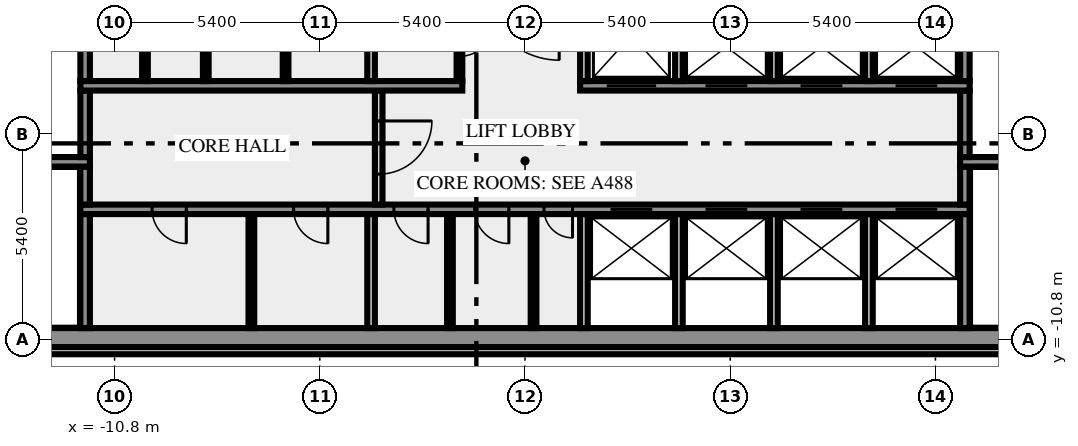
"""IFC4 building model, lengths in metres.
Left out: names, types, materials, properties, quantities, classifications, styles, units other than length and angle.
Written with IfcOpenShell. Run it as: python <this file> out.ifc"""

import sys

from ifc_helpers import new_model, si_unit, direction, frame, frame_2d, origin, place, context, subcontext, project, spatial, rectangle, extrude, element, fill, save


model = new_model("IFC4")
c1 = context("Model", 3, precision=1e-05, world=origin(), true_north=direction((0.0, 1.0)))
c2 = subcontext(c1, "Body", "Model", "MODEL_VIEW")
j1 = project(units=[si_unit("LENGTHUNIT", "METRE"), si_unit("PLANEANGLEUNIT", "RADIAN")], contexts=[c1])
p1 = place(None, origin())
s1 = spatial("IfcSite", under=j1, at=p1, CompositionType="ELEMENT")
p2 = place(p1, origin())
s2 = spatial("IfcBuilding", under=s1, at=p2, CompositionType="ELEMENT")
p3 = place(p2, frame((0.0, 0.0, 184.0)))
s3 = spatial("IfcBuildingStorey", under=s2, at=p3, CompositionType="ELEMENT", Elevation=184.0)
p4 = place(p3, frame((-17.444, -11.088, 0.0), z_axis=(0.0, 0.0, 1.0), x_axis=(1.0, 0.0, 0.0)))
e1 = element("IfcWall", 1, at=p4, inside=s3, PredefinedType="SOLIDWALL", context=c2, shape_type="SweptSolid", body=[
    extrude(rectangle(XDim=34.888, YDim=0.2, at=frame_2d((17.444, 0.0))), origin(), (0.0, 0.0, 1.0), 3.4),
])
p5 = place(p3, frame((-20.0, -10.75, 0.0), z_axis=(0.0, 0.0, 1.0), x_axis=(1.0, 0.0, 0.0)))
e2 = element("IfcWall", 2, at=p5, inside=s3, PredefinedType="SHEAR", context=c2, shape_type="SweptSolid", body=[
    extrude(rectangle(XDim=40.0, YDim=0.5, at=frame_2d((20.0, 0.0))), origin(), (0.0, 0.0, 1.0), 3.4),
])
p6 = place(p5, frame((0.8, 0.0, 1.0)))
e3 = element("IfcOpeningElement", 3, at=p6, cuts=e2, PredefinedType="OPENING", context=c2, shape_type="SweptSolid", body=[
    extrude(rectangle(XDim=1.2, YDim=1.2, at=frame_2d((0.6, 0.6))), frame((0.0, 0.26, 0.0), z_axis=(0.0, -1.0, 0.0), x_axis=(1.0, 0.0, 0.0)), (0.0, 0.0, 1.0), 0.52),
])
p7 = place(p5, frame((38.0, 0.0, 1.0)))
e4 = element("IfcOpeningElement", 4, at=p7, cuts=e2, PredefinedType="OPENING", context=c2, shape_type="SweptSolid", body=[
    extrude(rectangle(XDim=1.2, YDim=1.2, at=frame_2d((0.6, 0.6))), frame((0.0, 0.26, 0.0), z_axis=(0.0, -1.0, 0.0), x_axis=(1.0, 0.0, 0.0)), (0.0, 0.0, 1.0), 0.52),
])
p8 = place(p3, frame((-11.575, -10.5, 0.0), z_axis=(0.0, 0.0, 1.0), x_axis=(0.0, 1.0, 0.0)))
e5 = element("IfcWall", 5, at=p8, inside=s3, PredefinedType="SHEAR", context=c2, shape_type="SweptSolid", body=[
    extrude(rectangle(XDim=3.0, YDim=0.25, at=frame_2d((1.5, 0.0))), origin(), (0.0, 0.0, 1.0), 3.4),
])
p9 = place(p3, frame((-7.2, -10.5, 0.0), z_axis=(0.0, 0.0, 1.0), x_axis=(0.0, 1.0, 0.0)))
e6 = element("IfcWall", 6, at=p9, inside=s3, PredefinedType="PARTITIONING", context=c2, shape_type="SweptSolid", body=[
    extrude(rectangle(XDim=3.0, YDim=0.15, at=frame_2d((1.5, 0.0))), origin(), (0.0, 0.0, 1.0), 3.4),
])
p10 = place(p3, frame((-4.05, -10.5, 0.0), z_axis=(0.0, 0.0, 1.0), x_axis=(0.0, 1.0, 0.0)))
e7 = element("IfcWall", 7, at=p10, inside=s3, PredefinedType="SOLIDWALL", context=c2, shape_type="SweptSolid", body=[
    extrude(rectangle(XDim=3.0, YDim=0.2, at=frame_2d((1.5, 0.0))), origin(), (0.0, 0.0, 1.0), 3.4),
])
for number, where, z_axis, x_axis in (
    (8, (-1.975, -10.5, 0.0), (0.0, 0.0, 1.0), (0.0, 1.0, 0.0)),
    (9, (0.225, -10.5, 0.0), (0.0, 0.0, 1.0), (0.0, 1.0, 0.0)),
):
    element("IfcWall", number, at=place(p3, frame(where, z_axis=z_axis, x_axis=x_axis)), inside=s3, PredefinedType="PARTITIONING", context=c2, shape_type="SweptSolid", body=[
        extrude(rectangle(XDim=3.0, YDim=0.15, at=frame_2d((1.5, 0.0))), origin(), (0.0, 0.0, 1.0), 3.4),
    ])
for number, where, z_axis, x_axis in (
    (10, (1.55, -10.5, 0.0), (0.0, 0.0, 1.0), (0.0, 1.0, 0.0)),
    (11, (4.05, -10.5, 0.0), (0.0, 0.0, 1.0), (0.0, 1.0, 0.0)),
    (12, (6.55, -10.5, 0.0), (0.0, 0.0, 1.0), (0.0, 1.0, 0.0)),
    (13, (9.05, -10.5, 0.0), (0.0, 0.0, 1.0), (0.0, 1.0, 0.0)),
):
    element("IfcWall", number, at=place(p3, frame(where, z_axis=z_axis, x_axis=x_axis)), inside=s3, PredefinedType="SOLIDWALL", context=c2, shape_type="SweptSolid", body=[
        extrude(rectangle(XDim=3.0, YDim=0.2, at=frame_2d((1.5, 0.0))), origin(), (0.0, 0.0, 1.0), 3.4),
    ])
p11 = place(p3, frame((11.575, -10.5, 0.0), z_axis=(0.0, 0.0, 1.0), x_axis=(0.0, 1.0, 0.0)))
e14 = element("IfcWall", 14, at=p11, inside=s3, PredefinedType="SHEAR", context=c2, shape_type="SweptSolid", body=[
    extrude(rectangle(XDim=3.0, YDim=0.25, at=frame_2d((1.5, 0.0))), origin(), (0.0, 0.0, 1.0), 3.4),
])
p12 = place(p3, frame((11.7, -7.375, 0.0), z_axis=(0.0, 0.0, 1.0), x_axis=(-1.0, 0.0, 0.0)))
e15 = element("IfcWall", 15, at=p12, inside=s3, PredefinedType="SHEAR", context=c2, shape_type="SweptSolid", body=[
    extrude(rectangle(XDim=23.4, YDim=0.25, at=frame_2d((11.7, 0.0))), origin(), (0.0, 0.0, 1.0), 3.4),
])
p13 = place(p12, frame((20.613, 0.0, 0.0)))
e16 = element("IfcOpeningElement", 16, at=p13, cuts=e15, PredefinedType="OPENING", context=c2, shape_type="SweptSolid", body=[
    extrude(rectangle(XDim=0.9, YDim=2.1, at=frame_2d((0.45, 1.05))), frame((0.0, 0.135, 0.0), z_axis=(0.0, -1.0, 0.0), x_axis=(1.0, 0.0, 0.0)), (0.0, 0.0, 1.0), 0.27),
])
p14 = place(p12, frame((16.888, 0.0, 0.0)))
e17 = element("IfcOpeningElement", 17, at=p14, cuts=e15, PredefinedType="OPENING", context=c2, shape_type="SweptSolid", body=[
    extrude(rectangle(XDim=0.9, YDim=2.1, at=frame_2d((0.45, 1.05))), frame((0.0, 0.135, 0.0), z_axis=(0.0, -1.0, 0.0), x_axis=(1.0, 0.0, 0.0)), (0.0, 0.0, 1.0), 0.27),
])
p15 = place(p12, frame((14.25, 0.0, 0.0)))
e18 = element("IfcOpeningElement", 18, at=p15, cuts=e15, PredefinedType="OPENING", context=c2, shape_type="SweptSolid", body=[
    extrude(rectangle(XDim=0.9, YDim=2.1, at=frame_2d((0.45, 1.05))), frame((0.0, 0.135, 0.0), z_axis=(0.0, -1.0, 0.0), x_axis=(1.0, 0.0, 0.0)), (0.0, 0.0, 1.0), 0.27),
])
p16 = place(p12, frame((12.125, 0.0, 0.0)))
e19 = element("IfcOpeningElement", 19, at=p16, cuts=e15, PredefinedType="OPENING", context=c2, shape_type="SweptSolid", body=[
    extrude(rectangle(XDim=0.9, YDim=2.1, at=frame_2d((0.45, 1.05))), frame((0.0, 0.135, 0.0), z_axis=(0.0, -1.0, 0.0), x_axis=(1.0, 0.0, 0.0)), (0.0, 0.0, 1.0), 0.27),
])
p17 = place(p12, frame((10.45, 0.0, 0.0)))
e20 = element("IfcOpeningElement", 20, at=p17, cuts=e15, PredefinedType="OPENING", context=c2, shape_type="SweptSolid", body=[
    extrude(rectangle(XDim=0.75, YDim=2.1, at=frame_2d((0.375, 1.05))), frame((0.0, 0.135, 0.0), z_axis=(0.0, -1.0, 0.0), x_axis=(1.0, 0.0, 0.0)), (0.0, 0.0, 1.0), 0.27),
])
p18 = place(p12, frame((8.35, 0.0, 0.0)))
e21 = element("IfcOpeningElement", 21, at=p18, cuts=e15, PredefinedType="OPENING", context=c2, shape_type="SweptSolid", body=[
    extrude(rectangle(XDim=1.1, YDim=2.1, at=frame_2d((0.55, 1.05))), frame((0.0, 0.135, 0.0), z_axis=(0.0, -1.0, 0.0), x_axis=(1.0, 0.0, 0.0)), (0.0, 0.0, 1.0), 0.27),
])
p19 = place(p12, frame((5.85, 0.0, 0.0)))
e22 = element("IfcOpeningElement", 22, at=p19, cuts=e15, PredefinedType="OPENING", context=c2, shape_type="SweptSolid", body=[
    extrude(rectangle(XDim=1.1, YDim=2.1, at=frame_2d((0.55, 1.05))), frame((0.0, 0.135, 0.0), z_axis=(0.0, -1.0, 0.0), x_axis=(1.0, 0.0, 0.0)), (0.0, 0.0, 1.0), 0.27),
])
p20 = place(p12, frame((3.35, 0.0, 0.0)))
e23 = element("IfcOpeningElement", 23, at=p20, cuts=e15, PredefinedType="OPENING", context=c2, shape_type="SweptSolid", body=[
    extrude(rectangle(XDim=1.1, YDim=2.1, at=frame_2d((0.55, 1.05))), frame((0.0, 0.135, 0.0), z_axis=(0.0, -1.0, 0.0), x_axis=(1.0, 0.0, 0.0)), (0.0, 0.0, 1.0), 0.27),
])
p21 = place(p12, frame((0.85, 0.0, 0.0)))
e24 = element("IfcOpeningElement", 24, at=p21, cuts=e15, PredefinedType="OPENING", context=c2, shape_type="SweptSolid", body=[
    extrude(rectangle(XDim=1.1, YDim=2.1, at=frame_2d((0.55, 1.05))), frame((0.0, 0.135, 0.0), z_axis=(0.0, -1.0, 0.0), x_axis=(1.0, 0.0, 0.0)), (0.0, 0.0, 1.0), 0.27),
])
p22 = place(p3, frame((-11.575, -7.25, 0.0), z_axis=(0.0, 0.0, 1.0), x_axis=(0.0, 1.0, 0.0)))
e25 = element("IfcWall", 25, at=p22, inside=s3, PredefinedType="SHEAR", context=c2, shape_type="SweptSolid", body=[
    extrude(rectangle(XDim=1.0, YDim=0.25, at=frame_2d((0.5, 0.0))), origin(), (0.0, 0.0, 1.0), 3.4),
])
p23 = place(p3, frame((-3.85, -4.25, 0.0), z_axis=(0.0, 0.0, 1.0), x_axis=(0.0, -1.0, 0.0)))
e26 = element("IfcWall", 26, at=p23, inside=s3, PredefinedType="SOLIDWALL", context=c2, shape_type="SweptSolid", body=[
    extrude(rectangle(XDim=3.0, YDim=0.2, at=frame_2d((1.5, 0.0))), origin(), (0.0, 0.0, 1.0), 3.4),
])
p24 = place(p23, frame((0.8, 0.0, 0.0)))
e27 = element("IfcOpeningElement", 27, at=p24, cuts=e26, PredefinedType="OPENING", context=c2, shape_type="SweptSolid", body=[
    extrude(rectangle(XDim=1.4, YDim=2.1, at=frame_2d((0.7, 1.05))), frame((0.0, 0.11, 0.0), z_axis=(0.0, -1.0, 0.0), x_axis=(1.0, 0.0, 0.0)), (0.0, 0.0, 1.0), 0.22),
])
p25 = place(p3, frame((11.575, -7.25, 0.0), z_axis=(0.0, 0.0, 1.0), x_axis=(0.0, 1.0, 0.0)))
e28 = element("IfcWall", 28, at=p25, inside=s3, PredefinedType="SHEAR", context=c2, shape_type="SweptSolid", body=[
    extrude(rectangle(XDim=1.0, YDim=0.25, at=frame_2d((0.5, 0.0))), origin(), (0.0, 0.0, 1.0), 3.4),
])
p26 = place(p3, frame((-11.45, -6.125, 0.0), z_axis=(0.0, 0.0, 1.0), x_axis=(-1.0, 0.0, 0.0)))
e29 = element("IfcWall", 29, at=p26, inside=s3, PredefinedType="SHEAR", context=c2, shape_type="SweptSolid", body=[
    extrude(rectangle(XDim=8.05, YDim=0.25, at=frame_2d((4.025, 0.0))), origin(), (0.0, 0.0, 1.0), 3.4),
])
p27 = place(p26, frame((6.2, 0.0, 0.0)))
e30 = element("IfcOpeningElement", 30, at=p27, cuts=e29, PredefinedType="OPENING", context=c2, shape_type="SweptSolid", body=[
    extrude(rectangle(XDim=1.8, YDim=2.1, at=frame_2d((0.9, 1.05))), frame((0.0, 0.135, 0.0), z_axis=(0.0, -1.0, 0.0), x_axis=(1.0, 0.0, 0.0)), (0.0, 0.0, 1.0), 0.27),
])
p28 = place(p3, frame((19.5, -6.125, 0.0), z_axis=(0.0, 0.0, 1.0), x_axis=(-1.0, 0.0, 0.0)))
e31 = element("IfcWall", 31, at=p28, inside=s3, PredefinedType="SHEAR", context=c2, shape_type="SweptSolid", body=[
    extrude(rectangle(XDim=8.05, YDim=0.25, at=frame_2d((4.025, 0.0))), origin(), (0.0, 0.0, 1.0), 3.4),
])
p29 = place(p28, frame((0.05, 0.0, 0.0)))
e32 = element("IfcOpeningElement", 32, at=p29, cuts=e31, PredefinedType="OPENING", context=c2, shape_type="SweptSolid", body=[
    extrude(rectangle(XDim=1.8, YDim=2.1, at=frame_2d((0.9, 1.05))), frame((0.0, 0.135, 0.0), z_axis=(0.0, -1.0, 0.0), x_axis=(1.0, 0.0, 0.0)), (0.0, 0.0, 1.0), 0.27),
])
for number, where, z_axis, x_axis in (
    (33, (-11.575, -6.0, 0.0), (0.0, 0.0, 1.0), (0.0, 1.0, 0.0)),
    (34, (11.575, -6.0, 0.0), (0.0, 0.0, 1.0), (0.0, 1.0, 0.0)),
):
    element("IfcWall", number, at=place(p3, frame(where, z_axis=z_axis, x_axis=x_axis)), inside=s3, PredefinedType="SHEAR", context=c2, shape_type="SweptSolid", body=[
        extrude(rectangle(XDim=1.75, YDim=0.25, at=frame_2d((0.875, 0.0))), origin(), (0.0, 0.0, 1.0), 3.4),
    ])
p30 = place(p3, frame((-11.7, -4.125, 0.0), z_axis=(0.0, 0.0, 1.0), x_axis=(1.0, 0.0, 0.0)))
e35 = element("IfcWall", 35, at=p30, inside=s3, PredefinedType="SHEAR", context=c2, shape_type="SweptSolid", body=[
    extrude(rectangle(XDim=10.05, YDim=0.25, at=frame_2d((5.025, 0.0))), origin(), (0.0, 0.0, 1.0), 3.4),
])
p31 = place(p3, frame((1.45, -4.125, 0.0), z_axis=(0.0, 0.0, 1.0), x_axis=(1.0, 0.0, 0.0)))
e36 = element("IfcWall", 36, at=p31, inside=s3, PredefinedType="SHEAR", context=c2, shape_type="SweptSolid", body=[
    extrude(rectangle(XDim=10.25, YDim=0.25, at=frame_2d((5.125, 0.0))), origin(), (0.0, 0.0, 1.0), 3.4),
])
p32 = place(p31, frame((0.7, 0.0, 0.0)))
e37 = element("IfcOpeningElement", 37, at=p32, cuts=e36, PredefinedType="OPENING", context=c2, shape_type="SweptSolid", body=[
    extrude(rectangle(XDim=1.3, YDim=2.1, at=frame_2d((0.65, 1.05))), frame((0.0, 0.135, 0.0), z_axis=(0.0, -1.0, 0.0), x_axis=(1.0, 0.0, 0.0)), (0.0, 0.0, 1.0), 0.27),
])
p33 = place(p31, frame((3.3, 0.0, 0.0)))
e38 = element("IfcOpeningElement", 38, at=p33, cuts=e36, PredefinedType="OPENING", context=c2, shape_type="SweptSolid", body=[
    extrude(rectangle(XDim=1.1, YDim=2.1, at=frame_2d((0.55, 1.05))), frame((0.0, 0.135, 0.0), z_axis=(0.0, -1.0, 0.0), x_axis=(1.0, 0.0, 0.0)), (0.0, 0.0, 1.0), 0.27),
])
p34 = place(p31, frame((5.8, 0.0, 0.0)))
e39 = element("IfcOpeningElement", 39, at=p34, cuts=e36, PredefinedType="OPENING", context=c2, shape_type="SweptSolid", body=[
    extrude(rectangle(XDim=1.1, YDim=2.1, at=frame_2d((0.55, 1.05))), frame((0.0, 0.135, 0.0), z_axis=(0.0, -1.0, 0.0), x_axis=(1.0, 0.0, 0.0)), (0.0, 0.0, 1.0), 0.27),
])
p35 = place(p31, frame((8.3, 0.0, 0.0)))
e40 = element("IfcOpeningElement", 40, at=p35, cuts=e36, PredefinedType="OPENING", context=c2, shape_type="SweptSolid", body=[
    extrude(rectangle(XDim=1.1, YDim=2.1, at=frame_2d((0.55, 1.05))), frame((0.0, 0.135, 0.0), z_axis=(0.0, -1.0, 0.0), x_axis=(1.0, 0.0, 0.0)), (0.0, 0.0, 1.0), 0.27),
])
p36 = place(p3, frame((-11.575, -4.0, 0.0), z_axis=(0.0, 0.0, 1.0), x_axis=(0.0, 1.0, 0.0)))
e41 = element("IfcWall", 41, at=p36, inside=s3, PredefinedType="SHEAR", context=c2, shape_type="SweptSolid", body=[
    extrude(rectangle(XDim=2.3, YDim=0.25, at=frame_2d((1.15, 0.0))), origin(), (0.0, 0.0, 1.0), 3.4),
])
for number, where, z_axis, x_axis in (
    (42, (-10.0, -4.0, 0.0), (0.0, 0.0, 1.0), (0.0, 1.0, 0.0)),
    (43, (-8.4, -4.0, 0.0), (0.0, 0.0, 1.0), (0.0, 1.0, 0.0)),
    (44, (-6.3, -4.0, 0.0), (0.0, 0.0, 1.0), (0.0, 1.0, 0.0)),
):
    element("IfcWall", number, at=place(p3, frame(where, z_axis=z_axis, x_axis=x_axis)), inside=s3, PredefinedType="PARTITIONING", context=c2, shape_type="SweptSolid", body=[
        extrude(rectangle(XDim=2.3, YDim=0.15, at=frame_2d((1.15, 0.0))), origin(), (0.0, 0.0, 1.0), 3.4),
    ])
p37 = place(p3, frame((-4.05, -4.0, 0.0), z_axis=(0.0, 0.0, 1.0), x_axis=(0.0, 1.0, 0.0)))
e45 = element("IfcWall", 45, at=p37, inside=s3, PredefinedType="SOLIDWALL", context=c2, shape_type="SweptSolid", body=[
    extrude(rectangle(XDim=2.3, YDim=0.2, at=frame_2d((1.15, 0.0))), origin(), (0.0, 0.0, 1.0), 3.4),
])
p38 = place(p3, frame((-1.725, -1.7, 0.0), z_axis=(0.0, 0.0, 1.0), x_axis=(0.0, -1.0, 0.0)))
e46 = element("IfcWall", 46, at=p38, inside=s3, PredefinedType="PARTITIONING", context=c2, shape_type="SweptSolid", body=[
    extrude(rectangle(XDim=2.3, YDim=0.15, at=frame_2d((1.15, 0.0))), origin(), (0.0, 0.0, 1.0), 3.4),
])
p39 = place(p38, frame((0.75, 0.0, 0.0)))
e47 = element("IfcOpeningElement", 47, at=p39, cuts=e46, PredefinedType="OPENING", context=c2, shape_type="SweptSolid", body=[
    extrude(rectangle(XDim=0.9, YDim=2.1, at=frame_2d((0.45, 1.05))), frame((0.0, 0.085, 0.0), z_axis=(0.0, -1.0, 0.0), x_axis=(1.0, 0.0, 0.0)), (0.0, 0.0, 1.0), 0.17),
])
for number, where, z_axis, x_axis in (
    (48, (1.55, -4.0, 0.0), (0.0, 0.0, 1.0), (0.0, 1.0, 0.0)),
    (49, (4.05, -4.0, 0.0), (0.0, 0.0, 1.0), (0.0, 1.0, 0.0)),
    (50, (6.55, -4.0, 0.0), (0.0, 0.0, 1.0), (0.0, 1.0, 0.0)),
    (51, (9.05, -4.0, 0.0), (0.0, 0.0, 1.0), (0.0, 1.0, 0.0)),
):
    element("IfcWall", number, at=place(p3, frame(where, z_axis=z_axis, x_axis=x_axis)), inside=s3, PredefinedType="SOLIDWALL", context=c2, shape_type="SweptSolid", body=[
        extrude(rectangle(XDim=2.3, YDim=0.2, at=frame_2d((1.15, 0.0))), origin(), (0.0, 0.0, 1.0), 3.4),
    ])
p40 = place(p3, frame((11.575, -4.0, 0.0), z_axis=(0.0, 0.0, 1.0), x_axis=(0.0, 1.0, 0.0)))
e52 = element("IfcWall", 52, at=p40, inside=s3, PredefinedType="SHEAR", context=c2, shape_type="SweptSolid", body=[
    extrude(rectangle(XDim=2.3, YDim=0.25, at=frame_2d((1.15, 0.0))), origin(), (0.0, 0.0, 1.0), 3.4),
])
p41 = place(p13, origin())
e53 = element("IfcDoor", 53, at=p41, inside=s3, OperationType="SINGLE_SWING_RIGHT", PredefinedType="DOOR", context=c2, shape_type="SweptSolid", body=[
    extrude(rectangle(XDim=0.9, YDim=2.1, at=frame_2d((0.45, 1.05))), frame((0.0, 0.025, 0.0), z_axis=(0.0, -1.0, 0.0), x_axis=(1.0, 0.0, 0.0)), (0.0, 0.0, 1.0), 0.05),
])
fill(e16, e53)
p42 = place(p14, origin())
e54 = element("IfcDoor", 54, at=p42, inside=s3, OperationType="SINGLE_SWING_RIGHT", PredefinedType="DOOR", context=c2, shape_type="SweptSolid", body=[
    extrude(rectangle(XDim=0.9, YDim=2.1, at=frame_2d((0.45, 1.05))), frame((0.0, 0.025, 0.0), z_axis=(0.0, -1.0, 0.0), x_axis=(1.0, 0.0, 0.0)), (0.0, 0.0, 1.0), 0.05),
])
fill(e17, e54)
p43 = place(p15, origin())
e55 = element("IfcDoor", 55, at=p43, inside=s3, OperationType="SINGLE_SWING_RIGHT", PredefinedType="DOOR", context=c2, shape_type="SweptSolid", body=[
    extrude(rectangle(XDim=0.9, YDim=2.1, at=frame_2d((0.45, 1.05))), frame((0.0, 0.025, 0.0), z_axis=(0.0, -1.0, 0.0), x_axis=(1.0, 0.0, 0.0)), (0.0, 0.0, 1.0), 0.05),
])
fill(e18, e55)
p44 = place(p16, origin())
e56 = element("IfcDoor", 56, at=p44, inside=s3, OperationType="SINGLE_SWING_RIGHT", PredefinedType="DOOR", context=c2, shape_type="SweptSolid", body=[
    extrude(rectangle(XDim=0.9, YDim=2.1, at=frame_2d((0.45, 1.05))), frame((0.0, 0.025, 0.0), z_axis=(0.0, -1.0, 0.0), x_axis=(1.0, 0.0, 0.0)), (0.0, 0.0, 1.0), 0.05),
])
fill(e19, e56)
p45 = place(p17, origin())
e57 = element("IfcDoor", 57, at=p45, inside=s3, OperationType="SINGLE_SWING_LEFT", PredefinedType="DOOR", context=c2, shape_type="SweptSolid", body=[
    extrude(rectangle(XDim=0.75, YDim=2.1, at=frame_2d((0.375, 1.05))), frame((0.0, 0.025, 0.0), z_axis=(0.0, -1.0, 0.0), x_axis=(1.0, 0.0, 0.0)), (0.0, 0.0, 1.0), 0.05),
])
fill(e20, e57)
p46 = place(p18, origin())
e58 = element("IfcDoor", 58, at=p46, inside=s3, OperationType="DOUBLE_DOOR_SLIDING", PredefinedType="DOOR", context=c2, shape_type="SweptSolid", body=[
    extrude(rectangle(XDim=1.1, YDim=2.1, at=frame_2d((0.55, 1.05))), frame((0.0, 0.025, 0.0), z_axis=(0.0, -1.0, 0.0), x_axis=(1.0, 0.0, 0.0)), (0.0, 0.0, 1.0), 0.05),
])
fill(e21, e58)
p47 = place(p19, origin())
e59 = element("IfcDoor", 59, at=p47, inside=s3, OperationType="DOUBLE_DOOR_SLIDING", PredefinedType="DOOR", context=c2, shape_type="SweptSolid", body=[
    extrude(rectangle(XDim=1.1, YDim=2.1, at=frame_2d((0.55, 1.05))), frame((0.0, 0.025, 0.0), z_axis=(0.0, -1.0, 0.0), x_axis=(1.0, 0.0, 0.0)), (0.0, 0.0, 1.0), 0.05),
])
fill(e22, e59)
p48 = place(p20, origin())
e60 = element("IfcDoor", 60, at=p48, inside=s3, OperationType="DOUBLE_DOOR_SLIDING", PredefinedType="DOOR", context=c2, shape_type="SweptSolid", body=[
    extrude(rectangle(XDim=1.1, YDim=2.1, at=frame_2d((0.55, 1.05))), frame((0.0, 0.025, 0.0), z_axis=(0.0, -1.0, 0.0), x_axis=(1.0, 0.0, 0.0)), (0.0, 0.0, 1.0), 0.05),
])
fill(e23, e60)
p49 = place(p21, origin())
e61 = element("IfcDoor", 61, at=p49, inside=s3, OperationType="DOUBLE_DOOR_SLIDING", PredefinedType="DOOR", context=c2, shape_type="SweptSolid", body=[
    extrude(rectangle(XDim=1.1, YDim=2.1, at=frame_2d((0.55, 1.05))), frame((0.0, 0.025, 0.0), z_axis=(0.0, -1.0, 0.0), x_axis=(1.0, 0.0, 0.0)), (0.0, 0.0, 1.0), 0.05),
])
fill(e24, e61)
p50 = place(p24, origin())
e62 = element("IfcDoor", 62, at=p50, inside=s3, OperationType="DOUBLE_DOOR_SINGLE_SWING", PredefinedType="DOOR", context=c2, shape_type="SweptSolid", body=[
    extrude(rectangle(XDim=1.4, YDim=2.1, at=frame_2d((0.7, 1.05))), frame((0.0, 0.025, 0.0), z_axis=(0.0, -1.0, 0.0), x_axis=(1.0, 0.0, 0.0)), (0.0, 0.0, 1.0), 0.05),
])
fill(e27, e62)
p51 = place(p32, origin())
e63 = element("IfcDoor", 63, at=p51, inside=s3, OperationType="DOUBLE_DOOR_SLIDING", PredefinedType="DOOR", context=c2, shape_type="SweptSolid", body=[
    extrude(rectangle(XDim=1.3, YDim=2.1, at=frame_2d((0.65, 1.05))), frame((0.0, 0.025, 0.0), z_axis=(0.0, -1.0, 0.0), x_axis=(1.0, 0.0, 0.0)), (0.0, 0.0, 1.0), 0.05),
])
fill(e37, e63)
p52 = place(p33, origin())
e64 = element("IfcDoor", 64, at=p52, inside=s3, OperationType="DOUBLE_DOOR_SLIDING", PredefinedType="DOOR", context=c2, shape_type="SweptSolid", body=[
    extrude(rectangle(XDim=1.1, YDim=2.1, at=frame_2d((0.55, 1.05))), frame((0.0, 0.025, 0.0), z_axis=(0.0, -1.0, 0.0), x_axis=(1.0, 0.0, 0.0)), (0.0, 0.0, 1.0), 0.05),
])
fill(e38, e64)
p53 = place(p34, origin())
e65 = element("IfcDoor", 65, at=p53, inside=s3, OperationType="DOUBLE_DOOR_SLIDING", PredefinedType="DOOR", context=c2, shape_type="SweptSolid", body=[
    extrude(rectangle(XDim=1.1, YDim=2.1, at=frame_2d((0.55, 1.05))), frame((0.0, 0.025, 0.0), z_axis=(0.0, -1.0, 0.0), x_axis=(1.0, 0.0, 0.0)), (0.0, 0.0, 1.0), 0.05),
])
fill(e39, e65)
p54 = place(p35, origin())
e66 = element("IfcDoor", 66, at=p54, inside=s3, OperationType="DOUBLE_DOOR_SLIDING", PredefinedType="DOOR", context=c2, shape_type="SweptSolid", body=[
    extrude(rectangle(XDim=1.1, YDim=2.1, at=frame_2d((0.55, 1.05))), frame((0.0, 0.025, 0.0), z_axis=(0.0, -1.0, 0.0), x_axis=(1.0, 0.0, 0.0)), (0.0, 0.0, 1.0), 0.05),
])
fill(e40, e66)
p55 = place(p39, origin())
e67 = element("IfcDoor", 67, at=p55, inside=s3, OperationType="SINGLE_SWING_RIGHT", PredefinedType="DOOR", context=c2, shape_type="SweptSolid", body=[
    extrude(rectangle(XDim=0.9, YDim=2.1, at=frame_2d((0.45, 1.05))), frame((0.0, 0.025, 0.0), z_axis=(0.0, -1.0, 0.0), x_axis=(1.0, 0.0, 0.0)), (0.0, 0.0, 1.0), 0.05),
])
fill(e47, e67)
save(model, sys.argv[1])
